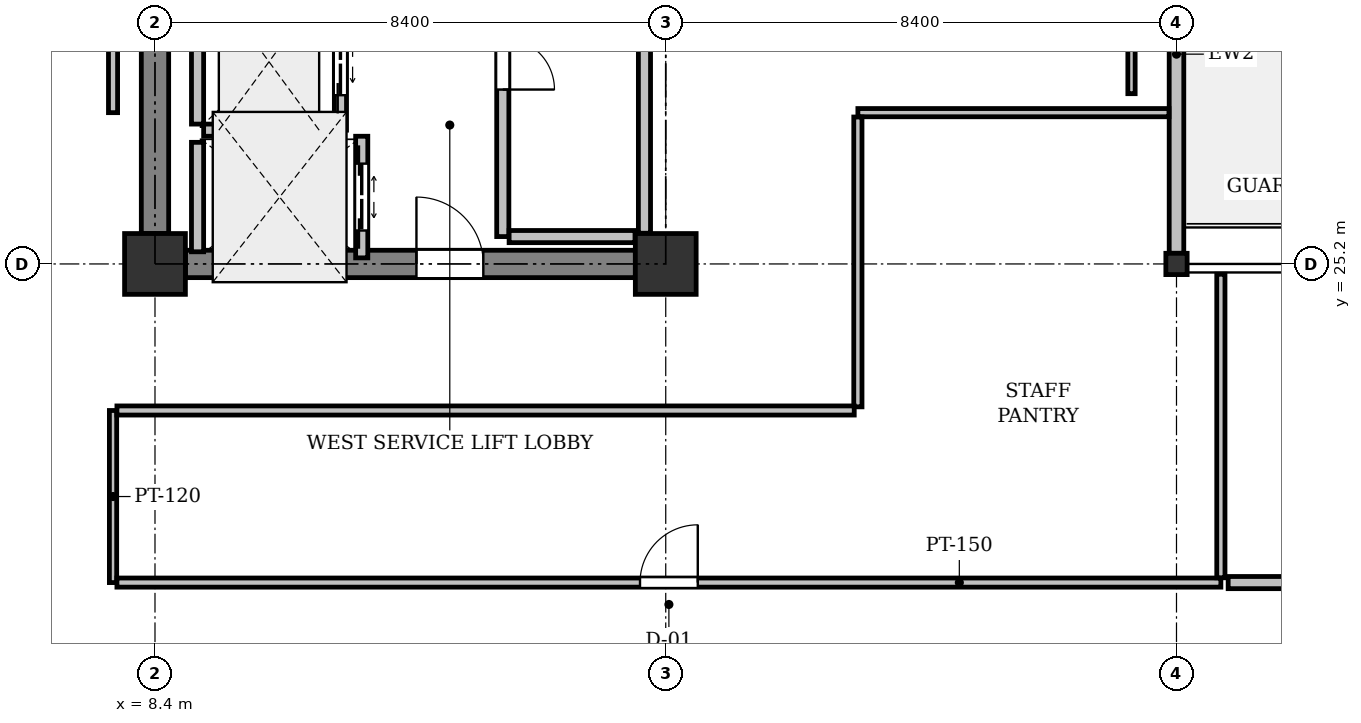
"""IFC4 building model, lengths in metres.
Left out: names, types, materials, properties, quantities, classifications, styles, units other than length and angle.
Written with IfcOpenShell. Run it as: python <this file> out.ifc"""

import sys

from ifc_helpers import new_model, si_unit, direction, frame, frame_2d, origin, origin_2d, place, context, subcontext, project, spatial, rectangle, i_section, extrude, element, fill, save


model = new_model("IFC4")
c1 = context("Model", 3, precision=1e-05, world=origin(), true_north=direction((0.0, 1.0)))
c2 = subcontext(c1, "Body", "Model", "MODEL_VIEW")
j1 = project(units=[si_unit("LENGTHUNIT", "METRE"), si_unit("PLANEANGLEUNIT", "RADIAN")], contexts=[c1])
p1 = place(None, origin())
s1 = spatial("IfcSite", under=j1, at=p1, CompositionType="ELEMENT")
p2 = place(p1, origin())
s2 = spatial("IfcBuilding", under=s1, at=p2, CompositionType="ELEMENT")
p3 = place(p2, frame((0.0, 0.0, 237.0)))
s3 = spatial("IfcBuildingStorey", under=s2, at=p3, CompositionType="ELEMENT", Elevation=237.0)
for number, where, z_axis, x_axis in (
    (1, (8.4, 25.2, 0.0), (0.0, 0.0, 1.0), (1.0, 0.0, 0.0)),
    (2, (16.8, 25.2, 0.0), (0.0, 0.0, 1.0), (1.0, 0.0, 0.0)),
):
    element("IfcColumn", number, at=place(p3, frame(where, z_axis=z_axis, x_axis=x_axis)), inside=s3, PredefinedType="COLUMN", context=c2, shape_type="SweptSolid", body=[
        extrude(rectangle(XDim=1.0, YDim=1.0, at=origin_2d()), origin(), (0.0, 0.0, 1.0), 4.1),
    ])
p4 = place(p3, frame((25.2, 25.2, 0.0), z_axis=(0.0, 0.0, 1.0), x_axis=(1.0, 0.0, 0.0)))
e3 = element("IfcColumn", 3, at=p4, inside=s3, PredefinedType="COLUMN", context=c2, shape_type="SweptSolid", body=[
    extrude(i_section(OverallWidth=0.35, OverallDepth=0.35, WebThickness=0.02, FlangeThickness=0.032, at=origin_2d()), origin(), (0.0, 0.0, 1.0), 4.1),
])
p5 = place(p3, frame((25.2, 33.425, 0.0), z_axis=(0.0, 0.0, 1.0), x_axis=(0.0, -1.0, 0.0)))
e4 = element("IfcWall", 4, at=p5, inside=s3, PredefinedType="STANDARD", context=c2, shape_type="SweptSolid", body=[
    extrude(rectangle(XDim=8.05, YDim=0.24, at=frame_2d((4.025, 0.0))), origin(), (0.0, 0.0, 1.0), 3.525),
])
p6 = place(p5, frame((0.3, 0.0, 0.0)))
e5 = element("IfcOpeningElement", 5, at=p6, cuts=e4, PredefinedType="OPENING", context=c2, shape_type="SweptSolid", body=[
    extrude(rectangle(XDim=1.2, YDim=2.2, at=frame_2d((0.6, 1.1))), frame((0.0, 0.13, 0.0), z_axis=(0.0, -1.0, 0.0), x_axis=(1.0, 0.0, 0.0)), (0.0, 0.0, 1.0), 0.26),
])
p7 = place(p5, frame((2.154, 0.0, 0.9)))
e6 = element("IfcOpeningElement", 6, at=p7, cuts=e4, PredefinedType="OPENING", context=c2, shape_type="SweptSolid", body=[
    extrude(rectangle(XDim=1.5, YDim=1.6, at=frame_2d((0.75, 0.8))), frame((0.0, 0.13, 0.0), z_axis=(0.0, -1.0, 0.0), x_axis=(1.0, 0.0, 0.0)), (0.0, 0.0, 1.0), 0.26),
])
p8 = place(p3, frame((8.4, 25.7, 0.0), z_axis=(0.0, 0.0, 1.0), x_axis=(0.0, 1.0, 0.0)))
e7 = element("IfcWall", 7, at=p8, inside=s3, PredefinedType="SHEAR", context=c2, shape_type="SweptSolid", body=[
    extrude(rectangle(XDim=7.4, YDim=0.45, at=frame_2d((3.7, 0.0))), origin(), (0.0, 0.0, 1.0), 3.825),
])
p9 = place(p3, frame((8.9, 25.2, 0.0), z_axis=(0.0, 0.0, 1.0), x_axis=(1.0, 0.0, 0.0)))
e8 = element("IfcWall", 8, at=p9, inside=s3, PredefinedType="SHEAR", context=c2, shape_type="SweptSolid", body=[
    extrude(rectangle(XDim=7.4, YDim=0.45, at=frame_2d((3.7, 0.0))), origin(), (0.0, 0.0, 1.0), 3.825),
])
p10 = place(p9, frame((3.8, 0.0, 0.0)))
e9 = element("IfcOpeningElement", 9, at=p10, cuts=e8, PredefinedType="OPENING", context=c2, shape_type="SweptSolid", body=[
    extrude(rectangle(XDim=1.1, YDim=2.15, at=frame_2d((0.55, 1.075))), frame((0.0, 0.235, 0.0), z_axis=(0.0, -1.0, 0.0), x_axis=(1.0, 0.0, 0.0)), (0.0, 0.0, 1.0), 0.47),
])
p11 = place(p3, frame((11.45, 27.4, 0.0), z_axis=(0.0, 0.0, 1.0), x_axis=(0.0, 1.0, 0.0)))
e10 = element("IfcWall", 10, at=p11, inside=s3, PredefinedType="PARTITIONING", context=c2, shape_type="SweptSolid", body=[
    extrude(rectangle(XDim=2.25, YDim=0.2, at=frame_2d((1.125, 0.0))), origin(), (0.0, 0.0, 1.0), 3.825),
])
p12 = place(p11, frame((0.575, 0.0, 0.0)))
e11 = element("IfcOpeningElement", 11, at=p12, cuts=e10, PredefinedType="OPENING", context=c2, shape_type="SweptSolid", body=[
    extrude(rectangle(XDim=1.1, YDim=2.2, at=frame_2d((0.55, 1.1))), frame((0.0, 0.11, 0.0), z_axis=(0.0, -1.0, 0.0), x_axis=(1.0, 0.0, 0.0)), (0.0, 0.0, 1.0), 0.22),
])
p13 = place(p3, frame((9.1, 27.5, 0.0), z_axis=(0.0, 0.0, 1.0), x_axis=(0.0, 1.0, 0.0)))
e12 = element("IfcWall", 12, at=p13, inside=s3, PredefinedType="PARTITIONING", context=c2, shape_type="SweptSolid", body=[
    extrude(rectangle(XDim=2.05, YDim=0.2, at=frame_2d((1.025, 0.0))), origin(), (0.0, 0.0, 1.0), 3.825),
])
p14 = place(p3, frame((9.2, 27.4, 0.0), z_axis=(0.0, 0.0, 1.0), x_axis=(1.0, 0.0, 0.0)))
e13 = element("IfcWall", 13, at=p14, inside=s3, PredefinedType="PARTITIONING", context=c2, shape_type="SweptSolid", body=[
    extrude(rectangle(XDim=2.15, YDim=0.2, at=frame_2d((1.075, 0.0))), origin(), (0.0, 0.0, 1.0), 3.825),
])
p15 = place(p3, frame((11.8, 25.3, 0.0), z_axis=(0.0, 0.0, 1.0), x_axis=(0.0, 1.0, 0.0)))
e14 = element("IfcWall", 14, at=p15, inside=s3, PredefinedType="PARTITIONING", context=c2, shape_type="SweptSolid", body=[
    extrude(rectangle(XDim=2.0, YDim=0.2, at=frame_2d((1.0, 0.0))), origin(), (0.0, 0.0, 1.0), 3.825),
])
p16 = place(p15, frame((0.45, 0.0, 0.0)))
e15 = element("IfcOpeningElement", 15, at=p16, cuts=e14, PredefinedType="OPENING", context=c2, shape_type="SweptSolid", body=[
    extrude(rectangle(XDim=1.1, YDim=2.2, at=frame_2d((0.55, 1.1))), frame((0.0, 0.11, 0.0), z_axis=(0.0, -1.0, 0.0), x_axis=(1.0, 0.0, 0.0)), (0.0, 0.0, 1.0), 0.22),
])
p17 = place(p3, frame((9.1, 25.4, 0.0), z_axis=(0.0, 0.0, 1.0), x_axis=(0.0, 1.0, 0.0)))
e16 = element("IfcWall", 16, at=p17, inside=s3, PredefinedType="PARTITIONING", context=c2, shape_type="SweptSolid", body=[
    extrude(rectangle(XDim=1.8, YDim=0.2, at=frame_2d((0.9, 0.0))), origin(), (0.0, 0.0, 1.0), 3.825),
])
p18 = place(p3, frame((16.45, 25.705, 0.0), z_axis=(0.0, 0.0, 1.0), x_axis=(0.0, 1.0, 0.0)))
e17 = element("IfcWall", 17, at=p18, inside=s3, PredefinedType="PARTITIONING", context=c2, shape_type="SweptSolid", body=[
    extrude(rectangle(XDim=7.39, YDim=0.2, at=frame_2d((3.695, 0.0))), origin(), (0.0, 0.0, 1.0), 3.825),
])
p19 = place(p3, frame((14.12, 31.336, 0.0), z_axis=(0.0, 0.0, 1.0), x_axis=(0.0, -1.0, 0.0)))
e18 = element("IfcWall", 18, at=p19, inside=s3, PredefinedType="PARTITIONING", context=c2, shape_type="SweptSolid", body=[
    extrude(rectangle(XDim=5.686, YDim=0.2, at=frame_2d((2.843, 0.0))), origin(), (0.0, 0.0, 1.0), 3.825),
])
p20 = place(p19, frame((2.418, 0.0, 0.0)))
e19 = element("IfcOpeningElement", 19, at=p20, cuts=e18, PredefinedType="OPENING", context=c2, shape_type="SweptSolid", body=[
    extrude(rectangle(XDim=0.85, YDim=2.15, at=frame_2d((0.425, 1.075))), frame((0.0, 0.11, 0.0), z_axis=(0.0, -1.0, 0.0), x_axis=(1.0, 0.0, 0.0)), (0.0, 0.0, 1.0), 0.22),
])
p21 = place(p3, frame((14.224, 25.65, 0.0), z_axis=(0.0, 0.0, 1.0), x_axis=(1.0, 0.0, 0.0)))
e20 = element("IfcWall", 20, at=p21, inside=s3, PredefinedType="PARTITIONING", context=c2, shape_type="SweptSolid", body=[
    extrude(rectangle(XDim=2.071, YDim=0.2, at=frame_2d((1.035, 0.0))), origin(), (0.0, 0.0, 1.0), 3.825),
])
p22 = place(p3, frame((7.71, 22.79, 0.0), z_axis=(0.0, 0.0, 1.0), x_axis=(0.0, -1.0, 0.0)))
e21 = element("IfcWall", 21, at=p22, inside=s3, PredefinedType="PARTITIONING", context=c2, shape_type="SweptSolid", body=[
    extrude(rectangle(XDim=2.83, YDim=0.12, at=frame_2d((1.415, 0.0))), origin(), (0.0, 0.0, 1.0), 3.825),
])
p23 = place(p3, frame((7.774, 19.96, 0.0), z_axis=(0.0, 0.0, 1.0), x_axis=(1.0, 0.0, 0.0)))
e22 = element("IfcWall", 22, at=p23, inside=s3, PredefinedType="PARTITIONING", context=c2, shape_type="SweptSolid", body=[
    extrude(rectangle(XDim=18.156, YDim=0.15, at=frame_2d((9.078, 0.0))), origin(), (0.0, 0.0, 1.0), 3.371),
])
p24 = place(p23, frame((8.603, 0.0, 0.0)))
e23 = element("IfcOpeningElement", 23, at=p24, cuts=e22, PredefinedType="OPENING", context=c2, shape_type="SweptSolid", body=[
    extrude(rectangle(XDim=0.95, YDim=2.15, at=frame_2d((0.475, 1.075))), frame((0.0, 0.085, 0.0), z_axis=(0.0, -1.0, 0.0), x_axis=(1.0, 0.0, 0.0)), (0.0, 0.0, 1.0), 0.17),
])
p25 = place(p3, frame((25.93, 20.039, 0.0), z_axis=(0.0, 0.0, 1.0), x_axis=(0.0, 1.0, 0.0)))
e24 = element("IfcWall", 24, at=p25, inside=s3, PredefinedType="PARTITIONING", context=c2, shape_type="SweptSolid", body=[
    extrude(rectangle(XDim=4.992, YDim=0.135, at=frame_2d((2.496, 0.0))), origin(), (0.0, 0.0, 1.0), 3.825),
])
p26 = place(p3, frame((25.076, 27.688, 0.0), z_axis=(0.0, 0.0, 1.0), x_axis=(-1.0, 0.0, 0.0)))
e25 = element("IfcWall", 25, at=p26, inside=s3, PredefinedType="PARTITIONING", context=c2, shape_type="SweptSolid", body=[
    extrude(rectangle(XDim=5.116, YDim=0.135, at=frame_2d((2.558, 0.0))), origin(), (0.0, 0.0, 1.0), 3.518),
])
p27 = place(p3, frame((19.96, 27.616, 0.0), z_axis=(0.0, 0.0, 1.0), x_axis=(0.0, -1.0, 0.0)))
e26 = element("IfcWall", 26, at=p27, inside=s3, PredefinedType="PARTITIONING", context=c2, shape_type="SweptSolid", body=[
    extrude(rectangle(XDim=4.766, YDim=0.135, at=frame_2d((2.383, 0.0))), origin(), (0.0, 0.0, 1.0), 3.365),
])
p28 = place(p3, frame((19.9, 22.79, 0.0), z_axis=(0.0, 0.0, 1.0), x_axis=(-1.0, 0.0, 0.0)))
e27 = element("IfcWall", 27, at=p28, inside=s3, PredefinedType="PARTITIONING", context=c2, shape_type="SweptSolid", body=[
    extrude(rectangle(XDim=12.126, YDim=0.15, at=frame_2d((6.063, 0.0))), origin(), (0.0, 0.0, 1.0), 3.371),
])
p29 = place(p3, frame((7.71, 37.4, 0.0), z_axis=(0.0, 0.0, 1.0), x_axis=(0.0, -1.0, 0.0)))
e28 = element("IfcWall", 28, at=p29, inside=s3, PredefinedType="PARTITIONING", context=c2, shape_type="SweptSolid", body=[
    extrude(rectangle(XDim=9.712, YDim=0.15, at=frame_2d((4.856, 0.0))), origin(), (0.0, 0.0, 1.0), 3.365),
])
p30 = place(p3, frame((24.46, 30.25, 0.0), z_axis=(0.0, 0.0, 1.0), x_axis=(0.0, -1.0, 0.0)))
e29 = element("IfcWall", 29, at=p30, inside=s3, PredefinedType="PARTITIONING", context=c2, shape_type="SweptSolid", body=[
    extrude(rectangle(XDim=2.25, YDim=0.12, at=frame_2d((1.125, 0.0))), origin(), (0.0, 0.0, 1.0), 3.825),
])
p31 = place(p3, frame((26.05, 19.96, 0.0), z_axis=(0.0, 0.0, 1.0), x_axis=(1.0, 0.0, 0.0)))
e30 = element("IfcWall", 30, at=p31, inside=s3, PredefinedType="PARTITIONING", context=c2, shape_type="SweptSolid", body=[
    extrude(rectangle(XDim=10.6, YDim=0.2, at=frame_2d((5.3, 0.0))), origin(), (0.0, 0.0, 1.0), 3.371),
])
p32 = place(p10, origin())
e31 = element("IfcDoor", 31, at=p32, inside=s3, OperationType="SINGLE_SWING_LEFT", PredefinedType="DOOR", context=c2, shape_type="SweptSolid", body=[
    extrude(rectangle(XDim=1.1, YDim=2.15, at=frame_2d((0.55, 1.075))), frame((0.0, 0.025, 0.0), z_axis=(0.0, -1.0, 0.0), x_axis=(1.0, 0.0, 0.0)), (0.0, 0.0, 1.0), 0.05),
])
fill(e9, e31)
p33 = place(p12, origin())
e32 = element("IfcDoor", 32, at=p33, inside=s3, OperationType="DOUBLE_DOOR_SLIDING", PredefinedType="DOOR", context=c2, shape_type="SweptSolid", body=[
    extrude(rectangle(XDim=1.1, YDim=2.2, at=frame_2d((0.55, 1.1))), frame((0.0, 0.025, 0.0), z_axis=(0.0, -1.0, 0.0), x_axis=(1.0, 0.0, 0.0)), (0.0, 0.0, 1.0), 0.05),
])
fill(e11, e32)
p34 = place(p16, origin())
e33 = element("IfcDoor", 33, at=p34, inside=s3, OperationType="DOUBLE_DOOR_SLIDING", PredefinedType="DOOR", context=c2, shape_type="SweptSolid", body=[
    extrude(rectangle(XDim=1.1, YDim=2.2, at=frame_2d((0.55, 1.1))), frame((0.0, 0.025, 0.0), z_axis=(0.0, -1.0, 0.0), x_axis=(1.0, 0.0, 0.0)), (0.0, 0.0, 1.0), 0.05),
])
fill(e15, e33)
p35 = place(p20, origin())
e34 = element("IfcDoor", 34, at=p35, inside=s3, OperationType="SINGLE_SWING_RIGHT", PredefinedType="DOOR", context=c2, shape_type="SweptSolid", body=[
    extrude(rectangle(XDim=0.85, YDim=2.15, at=frame_2d((0.425, 1.075))), frame((0.0, 0.025, 0.0), z_axis=(0.0, -1.0, 0.0), x_axis=(1.0, 0.0, 0.0)), (0.0, 0.0, 1.0), 0.05),
])
fill(e19, e34)
p36 = place(p24, origin())
e35 = element("IfcDoor", 35, at=p36, inside=s3, OperationType="SINGLE_SWING_RIGHT", PredefinedType="DOOR", context=c2, shape_type="SweptSolid", body=[
    extrude(rectangle(XDim=0.95, YDim=2.15, at=frame_2d((0.475, 1.075))), frame((0.0, 0.025, 0.0), z_axis=(0.0, -1.0, 0.0), x_axis=(1.0, 0.0, 0.0)), (0.0, 0.0, 1.0), 0.05),
])
fill(e23, e35)
save(model, sys.argv[1])
